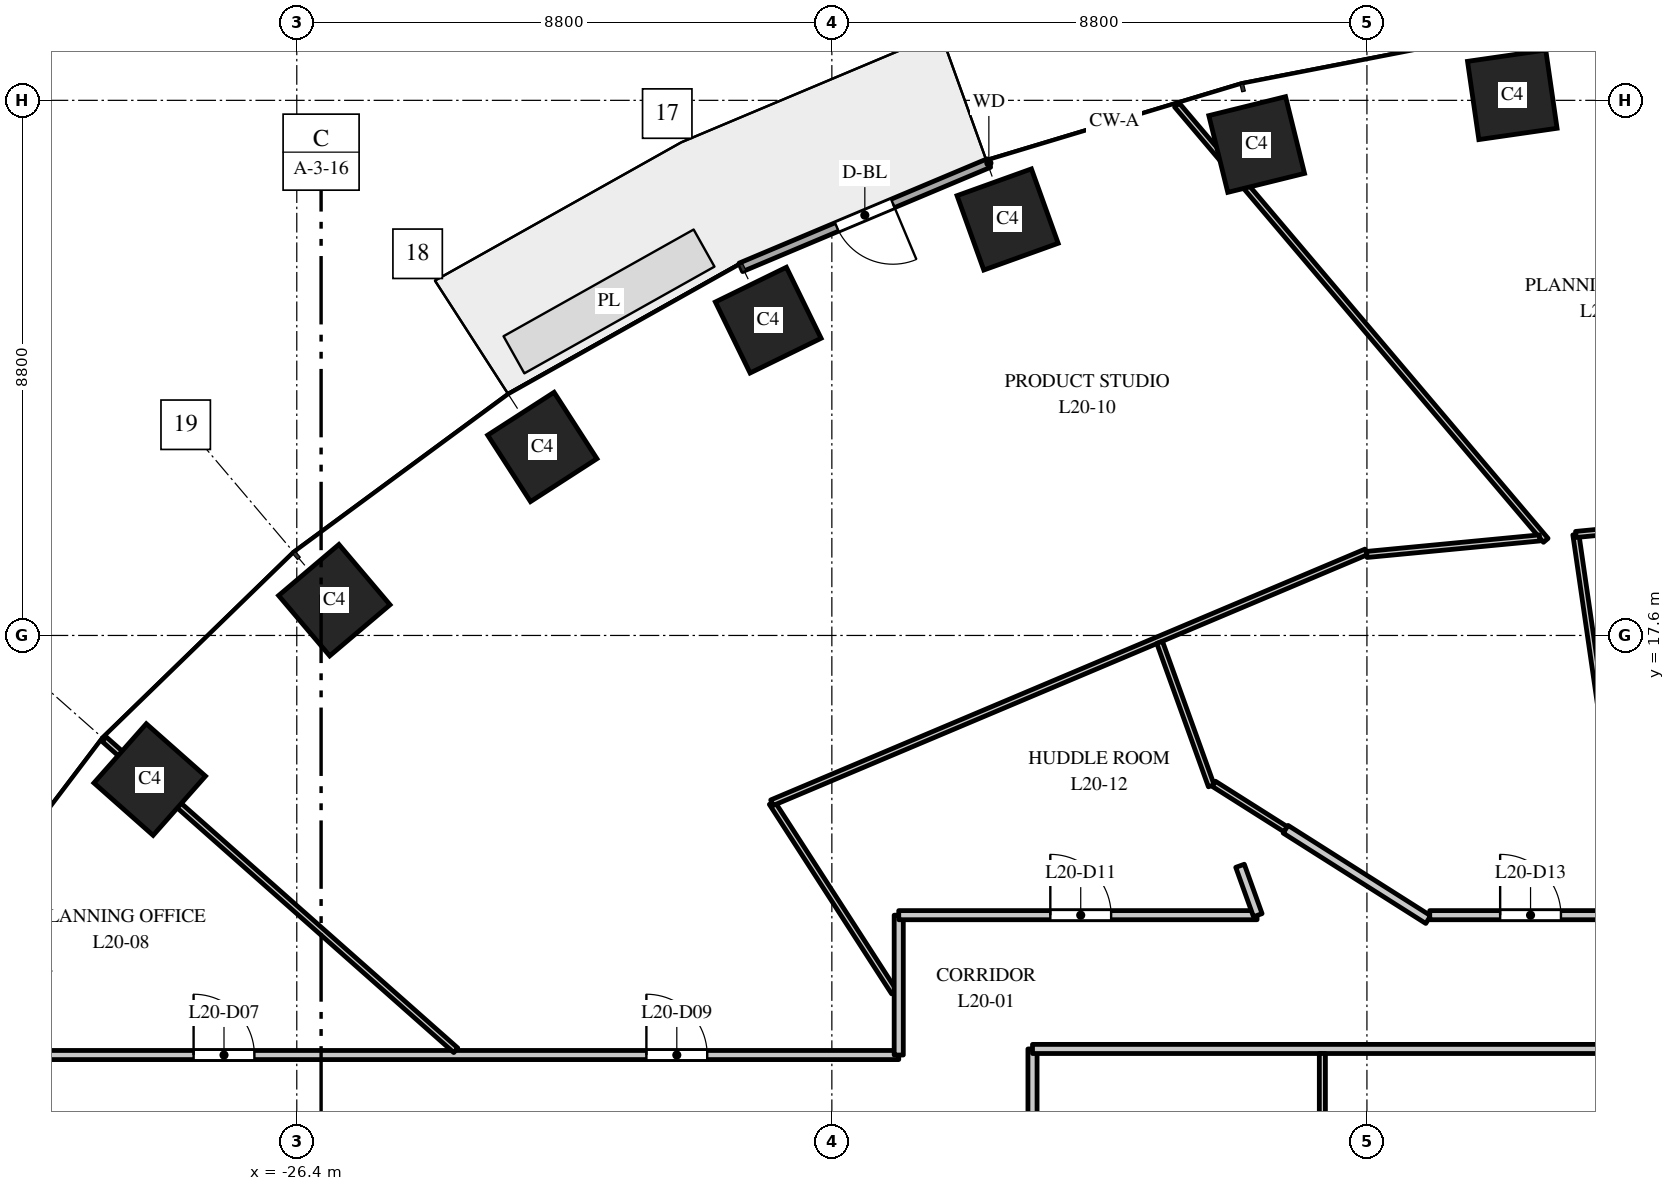
"""IFC4 building model, lengths in metres.
Left out: names, types, materials, properties, quantities, classifications, styles, units other than length and angle.
Written with IfcOpenShell. Run it as: python <this file> out.ifc"""

import sys

from ifc_helpers import new_model, si_unit, direction, frame, frame_2d, origin, origin_2d, place, context, subcontext, project, spatial, rectangle, extrude, element, fill, save


model = new_model("IFC4")
c1 = context("Model", 3, precision=1e-05, world=origin(), true_north=direction((0.0, 1.0)))
c2 = subcontext(c1, "Body", "Model", "MODEL_VIEW")
j1 = project(units=[si_unit("LENGTHUNIT", "METRE"), si_unit("PLANEANGLEUNIT", "RADIAN")], contexts=[c1])
p1 = place(None, origin())
s1 = spatial("IfcSite", under=j1, at=p1, CompositionType="ELEMENT")
p2 = place(p1, origin())
s2 = spatial("IfcBuilding", under=s1, at=p2, CompositionType="ELEMENT")
p3 = place(p2, frame((0.0, 0.0, 92.0)))
s3 = spatial("IfcBuildingStorey", under=s2, at=p3, CompositionType="ELEMENT", Elevation=92.0)
for number, where, z_axis, x_axis in (
    (1, (-6.409, 26.491, 0.0), (0.0, 0.0, 1.0), (-0.99, -0.143, 0.0)),
    (2, (-10.613, 25.674, 0.0), (0.0, 0.0, 1.0), (-0.971, -0.24, 0.0)),
    (3, (-14.709, 24.441, 0.0), (0.0, 0.0, 1.0), (-0.941, -0.338, 0.0)),
    (4, (-18.646, 22.785, 0.0), (0.0, 0.0, 1.0), (-0.898, -0.439, 0.0)),
    (5, (-22.362, 20.7, 0.0), (0.0, 0.0, 1.0), (-0.84, -0.542, 0.0)),
    (6, (-25.783, 18.18, 0.0), (0.0, 0.0, 1.0), (-0.763, -0.646, 0.0)),
    (7, (-28.819, 15.23, 0.0), (0.0, 0.0, 1.0), (-0.663, -0.749, 0.0)),
):
    element("IfcColumn", number, at=place(p3, frame(where, z_axis=z_axis, x_axis=x_axis)), inside=s3, PredefinedType="COLUMN", context=c2, shape_type="SweptSolid", body=[
        extrude(rectangle(XDim=1.3, YDim=1.3, at=origin_2d()), origin(), (0.0, 0.0, 1.0), 4.0),
    ])
p4 = place(p3, frame((-15.018, 25.369, 0.0), z_axis=(0.0, 0.0, 1.0), x_axis=(-0.921816985161, -0.387625393736, 0.0)))
e8 = element("IfcWall", 8, at=p4, inside=s3, PredefinedType="STANDARD", context=c2, shape_type="SweptSolid", body=[
    extrude(rectangle(XDim=4.426, YDim=0.15, at=frame_2d((2.213, 0.0))), origin(), (0.0, 0.0, 1.0), 3.7),
])
p5 = place(p4, frame((1.713, 0.0, 0.0)))
e9 = element("IfcOpeningElement", 9, at=p5, cuts=e8, PredefinedType="OPENING", context=c2, shape_type="SweptSolid", body=[
    extrude(rectangle(XDim=1.0, YDim=2.4, at=frame_2d((0.5, 1.2))), frame((0.0, 0.085, 0.0), z_axis=(0.0, -1.0, 0.0), x_axis=(1.0, 0.0, 0.0)), (0.0, 0.0, 1.0), 0.17),
])
p6 = place(p3, frame((-31.5, 10.7, 0.0), z_axis=(0.0, 0.0, 1.0), x_axis=(1.0, 0.0, 0.0)))
e10 = element("IfcWall", 10, at=p6, inside=s3, PredefinedType="PARTITIONING", context=c2, shape_type="SweptSolid", body=[
    extrude(rectangle(XDim=15.0, YDim=0.15, at=frame_2d((7.5, 0.0))), origin(), (0.0, 0.0, 1.0), 3.1),
])
p7 = place(p6, frame((3.403, 0.0, 0.0)))
e11 = element("IfcOpeningElement", 11, at=p7, cuts=e10, PredefinedType="OPENING", context=c2, shape_type="SweptSolid", body=[
    extrude(rectangle(XDim=1.0, YDim=2.1, at=frame_2d((0.5, 1.05))), frame((0.0, 0.085, 0.0), z_axis=(0.0, -1.0, 0.0), x_axis=(1.0, 0.0, 0.0)), (0.0, 0.0, 1.0), 0.17),
])
p8 = place(p6, frame((10.85, 0.0, 0.0)))
e12 = element("IfcOpeningElement", 12, at=p8, cuts=e10, PredefinedType="OPENING", context=c2, shape_type="SweptSolid", body=[
    extrude(rectangle(XDim=1.0, YDim=2.1, at=frame_2d((0.5, 1.05))), frame((0.0, 0.085, 0.0), z_axis=(0.0, -1.0, 0.0), x_axis=(1.0, 0.0, 0.0)), (0.0, 0.0, 1.0), 0.17),
])
p9 = place(p3, frame((-29.569, 15.895, 0.0), z_axis=(0.0, 0.0, 1.0), x_axis=(0.748985701008, -0.662586160198, 0.0)))
e13 = element("IfcWall", 13, at=p9, inside=s3, PredefinedType="PARTITIONING", context=c2, shape_type="SweptSolid", body=[
    extrude(rectangle(XDim=7.723, YDim=0.1, at=frame_2d((3.861, 0.0))), origin(), (0.0, 0.0, 1.0), 2.9),
])
p10 = place(p3, frame((-18.586, 14.849, 0.0), z_axis=(0.0, 0.0, 1.0), x_axis=(0.542227325377, -0.840231829684, 0.0)))
e14 = element("IfcWall", 14, at=p10, inside=s3, PredefinedType="PARTITIONING", context=c2, shape_type="SweptSolid", body=[
    extrude(rectangle(XDim=3.709, YDim=0.1, at=frame_2d((1.854, 0.0))), origin(), (0.0, 0.0, 1.0), 2.75),
])
p11 = place(p3, frame((-18.586, 14.849, 0.0), z_axis=(0.0, 0.0, 1.0), x_axis=(0.921309292198, 0.388830539066, 0.0)))
e15 = element("IfcWall", 15, at=p11, inside=s3, PredefinedType="PARTITIONING", context=c2, shape_type="SweptSolid", body=[
    extrude(rectangle(XDim=10.609, YDim=0.1, at=frame_2d((5.304, 0.0))), origin(), (0.0, 0.0, 1.0), 2.85),
])
p12 = place(p3, frame((-16.5, 10.7, 0.0), z_axis=(0.0, 0.0, 1.0), x_axis=(0.0, 1.0, 0.0)))
e16 = element("IfcWall", 16, at=p12, inside=s3, PredefinedType="PARTITIONING", context=c2, shape_type="SweptSolid", body=[
    extrude(rectangle(XDim=2.3, YDim=0.15, at=frame_2d((1.15, 0.0))), origin(), (0.0, 0.0, 1.0), 2.75),
])
p13 = place(p3, frame((-16.5, 13.0, 0.0), z_axis=(0.0, 0.0, 1.0), x_axis=(1.0, 0.0, 0.0)))
e17 = element("IfcWall", 17, at=p13, inside=s3, PredefinedType="PARTITIONING", context=c2, shape_type="SweptSolid", body=[
    extrude(rectangle(XDim=5.893, YDim=0.15, at=frame_2d((2.947, 0.0))), origin(), (0.0, 0.0, 1.0), 2.85),
])
p14 = place(p13, frame((2.493, 0.0, 0.0)))
e18 = element("IfcOpeningElement", 18, at=p14, cuts=e17, PredefinedType="OPENING", context=c2, shape_type="SweptSolid", body=[
    extrude(rectangle(XDim=1.0, YDim=2.1, at=frame_2d((0.5, 1.05))), frame((0.0, 0.085, 0.0), z_axis=(0.0, -1.0, 0.0), x_axis=(1.0, 0.0, 0.0)), (0.0, 0.0, 1.0), 0.17),
])
p15 = place(p3, frame((-14.3, -10.8, 0.0), z_axis=(0.0, 0.0, 1.0), x_axis=(0.0, 1.0, 0.0)))
e19 = element("IfcWall", 19, at=p15, inside=s3, PredefinedType="PARTITIONING", context=c2, shape_type="SweptSolid", body=[
    extrude(rectangle(XDim=21.6, YDim=0.15, at=frame_2d((10.8, 0.0))), origin(), (0.0, 0.0, 1.0), 2.75),
])
p16 = place(p15, frame((10.4, 0.0, 0.0)))
e20 = element("IfcOpeningElement", 20, at=p16, cuts=e19, PredefinedType="OPENING", context=c2, shape_type="SweptSolid", body=[
    extrude(rectangle(XDim=1.0, YDim=2.1, at=frame_2d((0.5, 1.05))), frame((0.0, 0.085, 0.0), z_axis=(0.0, -1.0, 0.0), x_axis=(1.0, 0.0, 0.0)), (0.0, 0.0, 1.0), 0.17),
])
p17 = place(p3, frame((-14.3, 10.8, 0.0), z_axis=(0.0, 0.0, 1.0), x_axis=(1.0, 0.0, 0.0)))
e21 = element("IfcWall", 21, at=p17, inside=s3, PredefinedType="PARTITIONING", context=c2, shape_type="SweptSolid", body=[
    extrude(rectangle(XDim=28.6, YDim=0.15, at=frame_2d((14.3, 0.0))), origin(), (0.0, 0.0, 1.0), 2.85),
])
p18 = place(p17, frame((11.433, 0.0, 0.0)))
e22 = element("IfcOpeningElement", 22, at=p18, cuts=e21, PredefinedType="OPENING", context=c2, shape_type="SweptSolid", body=[
    extrude(rectangle(XDim=1.0, YDim=2.1, at=frame_2d((0.5, 1.05))), frame((0.0, 0.085, 0.0), z_axis=(0.0, -1.0, 0.0), x_axis=(1.0, 0.0, 0.0)), (0.0, 0.0, 1.0), 0.17),
])
p19 = place(p17, frame((16.2, 0.0, 0.0)))
e23 = element("IfcOpeningElement", 23, at=p19, cuts=e21, PredefinedType="OPENING", context=c2, shape_type="SweptSolid", body=[
    extrude(rectangle(XDim=1.0, YDim=2.1, at=frame_2d((0.5, 1.05))), frame((0.0, 0.085, 0.0), z_axis=(0.0, -1.0, 0.0), x_axis=(1.0, 0.0, 0.0)), (0.0, 0.0, 1.0), 0.17),
])
p20 = place(p3, frame((-12.209, 17.486, 0.0), z_axis=(0.0, 0.0, 1.0), x_axis=(0.338698771758, -0.940894862357, 0.0)))
e24 = element("IfcWall", 24, at=p20, inside=s3, PredefinedType="PARTITIONING", context=c2, shape_type="SweptSolid", body=[
    extrude(rectangle(XDim=2.506, YDim=0.1, at=frame_2d((1.253, 0.0))), origin(), (0.0, 0.0, 1.0), 3.7),
])
p21 = place(p3, frame((-11.925, 26.323, 0.0), z_axis=(0.0, 0.0, 1.0), x_axis=(0.646476265577, -0.762934098101, 0.0)))
e25 = element("IfcWall", 25, at=p21, inside=s3, PredefinedType="PARTITIONING", context=c2, shape_type="SweptSolid", body=[
    extrude(rectangle(XDim=9.384, YDim=0.1, at=frame_2d((4.692, 0.0))), origin(), (0.0, 0.0, 1.0), 2.85),
])
p22 = place(p3, frame((-11.319, 15.161, 0.0), z_axis=(0.0, 0.0, 1.0), x_axis=(0.845102975348, -0.534603555037, 0.0)))
e26 = element("IfcWall", 26, at=p22, inside=s3, PredefinedType="PARTITIONING", context=c2, shape_type="SweptSolid", body=[
    extrude(rectangle(XDim=1.399, YDim=0.1, at=frame_2d((0.699, 0.0))), origin(), (0.0, 0.0, 1.0), 3.7),
])
p23 = place(p3, frame((-10.887, 13.812, 0.0), z_axis=(0.0, 0.0, 1.0), x_axis=(0.338378813476, -0.941009977944, 0.0)))
e27 = element("IfcWall", 27, at=p23, inside=s3, PredefinedType="PARTITIONING", context=c2, shape_type="SweptSolid", body=[
    extrude(rectangle(XDim=0.863, YDim=0.15, at=frame_2d((0.432, 0.0))), origin(), (0.0, 0.0, 1.0), 2.85),
])
p24 = place(p3, frame((-10.137, 14.413, 0.0), z_axis=(0.0, 0.0, 1.0), x_axis=(0.844666662568, -0.535292657475, 0.0)))
e28 = element("IfcWall", 28, at=p24, inside=s3, PredefinedType="PARTITIONING", context=c2, shape_type="SweptSolid", body=[
    extrude(rectangle(XDim=2.776, YDim=0.15, at=frame_2d((1.388, 0.0))), origin(), (0.0, 0.0, 1.0), 3.7),
])
p25 = place(p3, frame((-9.533, -10.725, 0.0), z_axis=(0.0, 0.0, 1.0), x_axis=(0.0, 1.0, 0.0)))
e29 = element("IfcWall", 29, at=p25, inside=s3, PredefinedType="PARTITIONING", context=c2, shape_type="SweptSolid", body=[
    extrude(rectangle(XDim=21.45, YDim=0.1, at=frame_2d((10.725, 0.0))), origin(), (0.0, 0.0, 1.0), 2.75),
])
p26 = place(p3, frame((-8.802, 18.932, 0.0), z_axis=(0.0, 0.0, 1.0), x_axis=(0.995447320833, 0.095313332995, 0.0)))
e30 = element("IfcWall", 30, at=p26, inside=s3, PredefinedType="PARTITIONING", context=c2, shape_type="SweptSolid", body=[
    extrude(rectangle(XDim=2.856, YDim=0.1, at=frame_2d((1.428, 0.0))), origin(), (0.0, 0.0, 1.0), 2.85),
])
p27 = place(p3, frame((-7.767, 13.0, 0.0), z_axis=(0.0, 0.0, 1.0), x_axis=(1.0, 0.0, 0.0)))
e31 = element("IfcWall", 31, at=p27, inside=s3, PredefinedType="PARTITIONING", context=c2, shape_type="SweptSolid", body=[
    extrude(rectangle(XDim=3.288, YDim=0.15, at=frame_2d((1.644, 0.0))), origin(), (0.0, 0.0, 1.0), 2.85),
])
p28 = place(p27, frame((1.158, 0.0, 0.0)))
e32 = element("IfcOpeningElement", 32, at=p28, cuts=e31, PredefinedType="OPENING", context=c2, shape_type="SweptSolid", body=[
    extrude(rectangle(XDim=1.0, YDim=2.1, at=frame_2d((0.5, 1.05))), frame((0.0, 0.085, 0.0), z_axis=(0.0, -1.0, 0.0), x_axis=(1.0, 0.0, 0.0)), (0.0, 0.0, 1.0), 0.17),
])
p29 = place(p3, frame((-5.364, 19.261, 0.0), z_axis=(0.0, 0.0, 1.0), x_axis=(0.143605013025, -0.989635084379, 0.0)))
e33 = element("IfcWall", 33, at=p29, inside=s3, PredefinedType="PARTITIONING", context=c2, shape_type="SweptSolid", body=[
    extrude(rectangle(XDim=6.323, YDim=0.1, at=frame_2d((3.161, 0.0))), origin(), (0.0, 0.0, 1.0), 3.7),
])
p30 = place(p3, frame((-5.364, 19.261, 0.0), z_axis=(0.0, 0.0, 1.0), x_axis=(0.995450891917, 0.095276029415, 0.0)))
e34 = element("IfcWall", 34, at=p30, inside=s3, PredefinedType="PARTITIONING", context=c2, shape_type="SweptSolid", body=[
    extrude(rectangle(XDim=4.787, YDim=0.1, at=frame_2d((2.393, 0.0))), origin(), (0.0, 0.0, 1.0), 2.85),
])
p31 = place(p5, origin())
e35 = element("IfcDoor", 35, at=p31, inside=s3, OperationType="SINGLE_SWING_LEFT", PredefinedType="DOOR", context=c2, shape_type="SweptSolid", body=[
    extrude(rectangle(XDim=1.0, YDim=2.4, at=frame_2d((0.5, 1.2))), frame((0.0, 0.025, 0.0), z_axis=(0.0, -1.0, 0.0), x_axis=(1.0, 0.0, 0.0)), (0.0, 0.0, 1.0), 0.05),
])
fill(e9, e35)
p32 = place(p7, origin())
e36 = element("IfcDoor", 36, at=p32, inside=s3, OperationType="SINGLE_SWING_LEFT", PredefinedType="DOOR", context=c2, shape_type="SweptSolid", body=[
    extrude(rectangle(XDim=1.0, YDim=2.1, at=frame_2d((0.5, 1.05))), frame((0.0, 0.025, 0.0), z_axis=(0.0, -1.0, 0.0), x_axis=(1.0, 0.0, 0.0)), (0.0, 0.0, 1.0), 0.05),
])
fill(e11, e36)
p33 = place(p8, origin())
e37 = element("IfcDoor", 37, at=p33, inside=s3, OperationType="SINGLE_SWING_LEFT", PredefinedType="DOOR", context=c2, shape_type="SweptSolid", body=[
    extrude(rectangle(XDim=1.0, YDim=2.1, at=frame_2d((0.5, 1.05))), frame((0.0, 0.025, 0.0), z_axis=(0.0, -1.0, 0.0), x_axis=(1.0, 0.0, 0.0)), (0.0, 0.0, 1.0), 0.05),
])
fill(e12, e37)
p34 = place(p14, origin())
e38 = element("IfcDoor", 38, at=p34, inside=s3, OperationType="SINGLE_SWING_LEFT", PredefinedType="DOOR", context=c2, shape_type="SweptSolid", body=[
    extrude(rectangle(XDim=1.0, YDim=2.1, at=frame_2d((0.5, 1.05))), frame((0.0, 0.025, 0.0), z_axis=(0.0, -1.0, 0.0), x_axis=(1.0, 0.0, 0.0)), (0.0, 0.0, 1.0), 0.05),
])
fill(e18, e38)
p35 = place(p28, origin())
e39 = element("IfcDoor", 39, at=p35, inside=s3, OperationType="SINGLE_SWING_LEFT", PredefinedType="DOOR", context=c2, shape_type="SweptSolid", body=[
    extrude(rectangle(XDim=1.0, YDim=2.1, at=frame_2d((0.5, 1.05))), frame((0.0, 0.025, 0.0), z_axis=(0.0, -1.0, 0.0), x_axis=(1.0, 0.0, 0.0)), (0.0, 0.0, 1.0), 0.05),
])
fill(e32, e39)
save(model, sys.argv[1])
